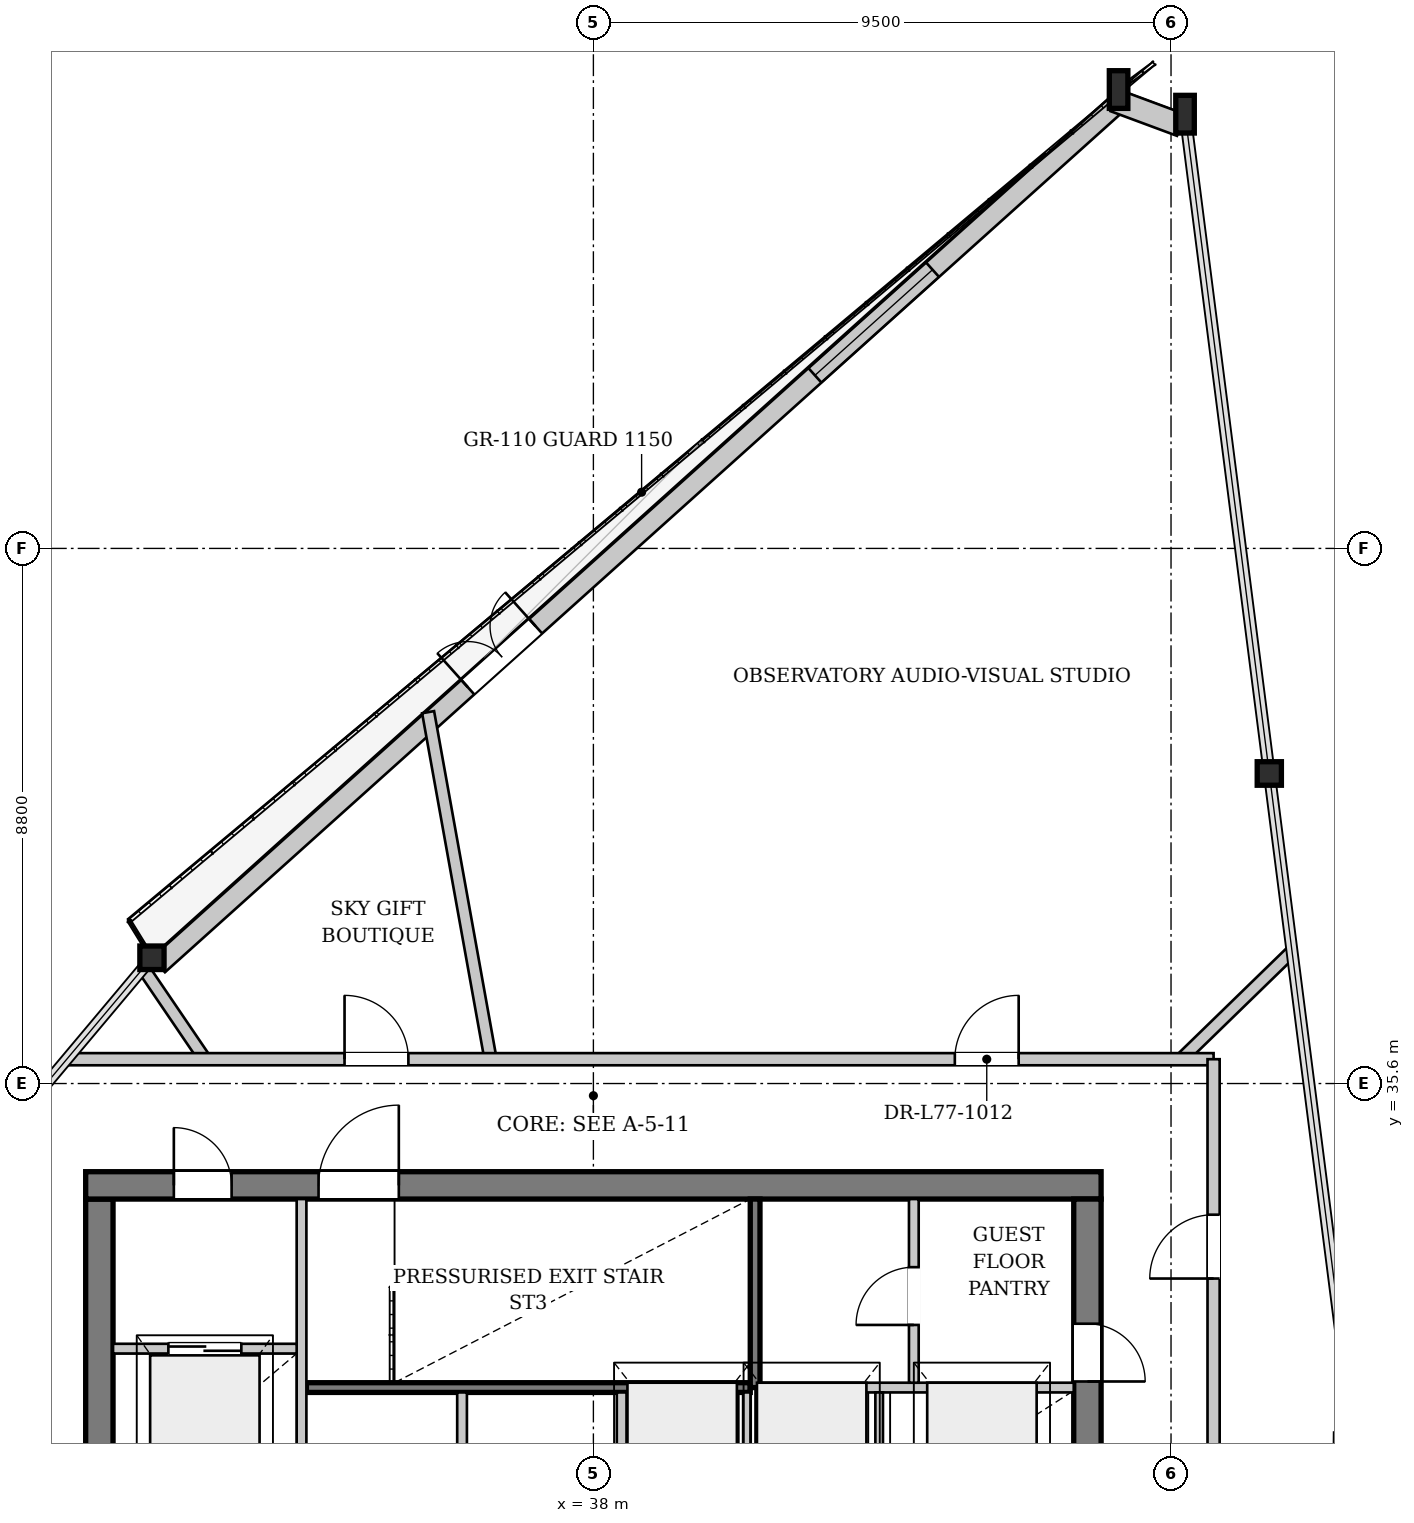
"""IFC4 building model, lengths in metres.
Left out: names, types, materials, properties, quantities, classifications, styles, units other than length and angle.
Written with IfcOpenShell. Run it as: python <this file> out.ifc"""

import sys

from ifc_helpers import new_model, si_unit, direction, frame, frame_2d, origin, origin_2d, place, context, subcontext, project, spatial, rectangle, i_section, extrude, source, transform, mapped, element, fill, save


model = new_model("IFC4")
c1 = context("Model", 3, precision=1e-05, world=origin(), true_north=direction((0.0, 1.0)))
c2 = subcontext(c1, "Body", "Model", "MODEL_VIEW")
j1 = project(units=[si_unit("LENGTHUNIT", "METRE"), si_unit("PLANEANGLEUNIT", "RADIAN")], contexts=[c1])
p1 = place(None, origin())
s1 = spatial("IfcSite", under=j1, at=p1, CompositionType="ELEMENT")
p2 = place(p1, origin())
s2 = spatial("IfcBuilding", under=s1, at=p2, CompositionType="ELEMENT")
p3 = place(p2, frame((0.0, 0.0, 290.5)))
s3 = spatial("IfcBuildingStorey", under=s2, at=p3, CompositionType="ELEMENT", Elevation=290.5)
m1 = source(origin(), c2, "Body", "SweptSolid", [
    extrude(i_section(OverallWidth=0.305, OverallDepth=0.62, WebThickness=0.021, FlangeThickness=0.04, at=origin_2d()), origin(), (0.0, 0.0, 1.0), 4.255),
])
for number, where, z_axis, x_axis in (
    (1, (47.73, 51.541, 0.0), (0.0, 0.0, 1.0), (1.0, 0.0, 0.0)),
    (2, (46.638, 51.946, 0.0), (0.0, 0.0, 1.0), (1.0, 0.0, 0.0)),
):
    element("IfcColumn", number, at=place(p3, frame(where, z_axis=z_axis, x_axis=x_axis)), inside=s3, PredefinedType="COLUMN", context=c2, shape_type="MappedRepresentation", body=[
        mapped(m1, transform((0.0, 0.0, 0.0), x_axis=(1.0, 0.0, 0.0), y_axis=(0.0, 1.0, 0.0), z_axis=(0.0, 0.0, 1.0), scale=1.0)),
    ])
m2 = source(origin(), c2, "Body", "SweptSolid", [
    extrude(i_section(OverallWidth=0.398, OverallDepth=0.387, WebThickness=0.019, FlangeThickness=0.029, at=origin_2d()), origin(), (0.0, 0.0, 1.0), 4.255),
])
for number, where, z_axis, x_axis in (
    (3, (30.74, 37.668, 0.0), (0.0, 0.0, 1.0), (1.0, 0.0, 0.0)),
    (4, (49.116, 40.699, 0.0), (0.0, 0.0, 1.0), (1.0, 0.0, 0.0)),
):
    element("IfcColumn", number, at=place(p3, frame(where, z_axis=z_axis, x_axis=x_axis)), inside=s3, PredefinedType="COLUMN", context=c2, shape_type="MappedRepresentation", body=[
        mapped(m2, transform((0.0, 0.0, 0.0), x_axis=(1.0, 0.0, 0.0), y_axis=(0.0, 1.0, 0.0), z_axis=(0.0, 0.0, 1.0), scale=1.0)),
    ])
p4 = place(p3, frame((50.342, 29.858, 0.0), z_axis=(0.0, 0.0, 1.0), x_axis=(-0.010207538584, -0.999947901721, 0.0)))
e5 = element("IfcWall", 5, at=p4, inside=s3, PredefinedType="SOLIDWALL", context=c2, shape_type="SweptSolid", body=[
    extrude(rectangle(XDim=21.861, YDim=0.32, at=frame_2d((10.93, 0.0))), origin(), (0.0, 0.0, 1.0), 3.782),
])
p5 = place(p4, frame((6.445, 0.0, 0.0)))
e6 = element("IfcOpeningElement", 6, at=p5, cuts=e5, PredefinedType="OPENING", context=c2, shape_type="SweptSolid", body=[
    extrude(rectangle(XDim=1.5, YDim=2.3, at=frame_2d((0.75, 1.15))), frame((0.0, 0.17, 0.0), z_axis=(0.0, -1.0, 0.0), x_axis=(1.0, 0.0, 0.0)), (0.0, 0.0, 1.0), 0.34),
])
p6 = place(p4, frame((14.877, 0.0, 0.65)))
e7 = element("IfcOpeningElement", 7, at=p6, cuts=e5, PredefinedType="OPENING", context=c2, shape_type="SweptSolid", body=[
    extrude(rectangle(XDim=2.6, YDim=2.35, at=frame_2d((1.3, 1.175))), frame((0.0, 0.17, 0.0), z_axis=(0.0, -1.0, 0.0), x_axis=(1.0, 0.0, 0.0)), (0.0, 0.0, 1.0), 0.34),
])
p7 = place(p3, frame((30.847, 37.549, 0.0), z_axis=(0.0, 0.0, 1.0), x_axis=(0.743983447959, 0.668198046363, 0.0)))
e8 = element("IfcWall", 8, at=p7, inside=s3, PredefinedType="SOLIDWALL", context=c2, shape_type="SweptSolid", body=[
    extrude(rectangle(XDim=21.368, YDim=0.32, at=frame_2d((10.684, 0.0))), origin(), (0.0, 0.0, 1.0), 3.782),
])
p8 = place(p7, frame((6.838, 0.0, 0.0)))
e9 = element("IfcOpeningElement", 9, at=p8, cuts=e8, PredefinedType="OPENING", context=c2, shape_type="SweptSolid", body=[
    extrude(rectangle(XDim=1.5, YDim=2.3, at=frame_2d((0.75, 1.15))), frame((0.0, 0.17, 0.0), z_axis=(0.0, -1.0, 0.0), x_axis=(1.0, 0.0, 0.0)), (0.0, 0.0, 1.0), 0.34),
])
p9 = place(p7, frame((14.512, 0.0, 0.65)))
e10 = element("IfcOpeningElement", 10, at=p9, cuts=e8, PredefinedType="OPENING", context=c2, shape_type="SweptSolid", body=[
    extrude(rectangle(XDim=2.6, YDim=2.35, at=frame_2d((1.3, 1.175))), frame((0.0, 0.17, 0.0), z_axis=(0.0, -1.0, 0.0), x_axis=(1.0, 0.0, 0.0)), (0.0, 0.0, 1.0), 0.34),
])
p10 = place(p3, frame((46.572, 51.768, 0.0), z_axis=(0.0, 0.0, 1.0), x_axis=(0.937597063116, -0.347723665052, 0.0)))
e11 = element("IfcWall", 11, at=p10, inside=s3, PredefinedType="SOLIDWALL", context=c2, shape_type="SweptSolid", body=[
    extrude(rectangle(XDim=1.166, YDim=0.38, at=frame_2d((0.583, 0.0))), origin(), (0.0, 0.0, 1.0), 3.782),
])
p11 = place(p3, frame((29.875, 19.5, 0.0), z_axis=(0.0, 0.0, 1.0), x_axis=(0.0, 1.0, 0.0)))
e12 = element("IfcWall", 12, at=p11, inside=s3, PredefinedType="SHEAR", context=c2, shape_type="SweptSolid", body=[
    extrude(rectangle(XDim=14.2, YDim=0.45, at=frame_2d((7.1, 0.0))), origin(), (0.0, 0.0, 1.0), 4.24),
])
p12 = place(p11, frame((7.42, 0.0, 0.0)))
e13 = element("IfcOpeningElement", 13, at=p12, cuts=e12, PredefinedType="OPENING", context=c2, shape_type="SweptSolid", body=[
    extrude(rectangle(XDim=1.6, YDim=2.2, at=frame_2d((0.8, 1.1))), frame((0.0, 0.235, 0.0), z_axis=(0.0, -1.0, 0.0), x_axis=(1.0, 0.0, 0.0)), (0.0, 0.0, 1.0), 0.47),
])
p13 = place(p3, frame((29.65, 33.925, 0.0), z_axis=(0.0, 0.0, 1.0), x_axis=(1.0, 0.0, 0.0)))
e14 = element("IfcWall", 14, at=p13, inside=s3, PredefinedType="SHEAR", context=c2, shape_type="SweptSolid", body=[
    extrude(rectangle(XDim=16.7, YDim=0.45, at=frame_2d((8.35, 0.0))), origin(), (0.0, 0.0, 1.0), 4.24),
])
p14 = place(p13, frame((1.45, 0.0, 0.0)))
e15 = element("IfcOpeningElement", 15, at=p14, cuts=e14, PredefinedType="OPENING", context=c2, shape_type="SweptSolid", body=[
    extrude(rectangle(XDim=0.95, YDim=2.1, at=frame_2d((0.475, 1.05))), frame((0.0, 0.235, 0.0), z_axis=(0.0, -1.0, 0.0), x_axis=(1.0, 0.0, 0.0)), (0.0, 0.0, 1.0), 0.47),
])
p15 = place(p13, frame((3.83, 0.0, 0.0)))
e16 = element("IfcOpeningElement", 16, at=p15, cuts=e14, PredefinedType="OPENING", context=c2, shape_type="SweptSolid", body=[
    extrude(rectangle(XDim=1.32, YDim=2.2, at=frame_2d((0.66, 1.1))), frame((0.0, 0.235, 0.0), z_axis=(0.0, -1.0, 0.0), x_axis=(1.0, 0.0, 0.0)), (0.0, 0.0, 1.0), 0.47),
])
p16 = place(p3, frame((46.125, 33.7, 0.0), z_axis=(0.0, 0.0, 1.0), x_axis=(0.0, -1.0, 0.0)))
e17 = element("IfcWall", 17, at=p16, inside=s3, PredefinedType="SHEAR", context=c2, shape_type="SweptSolid", body=[
    extrude(rectangle(XDim=14.2, YDim=0.45, at=frame_2d((7.1, 0.0))), origin(), (0.0, 0.0, 1.0), 4.24),
])
p17 = place(p16, frame((5.18, 0.0, 0.0)))
e18 = element("IfcOpeningElement", 18, at=p17, cuts=e17, PredefinedType="OPENING", context=c2, shape_type="SweptSolid", body=[
    extrude(rectangle(XDim=1.6, YDim=2.2, at=frame_2d((0.8, 1.1))), frame((0.0, 0.235, 0.0), z_axis=(0.0, -1.0, 0.0), x_axis=(1.0, 0.0, 0.0)), (0.0, 0.0, 1.0), 0.47),
])
p18 = place(p16, frame((2.05, 0.0, 0.0)))
e19 = element("IfcOpeningElement", 19, at=p18, cuts=e17, PredefinedType="OPENING", context=c2, shape_type="SweptSolid", body=[
    extrude(rectangle(XDim=0.95, YDim=2.1, at=frame_2d((0.475, 1.05))), frame((0.0, 0.235, 0.0), z_axis=(0.0, -1.0, 0.0), x_axis=(1.0, 0.0, 0.0)), (0.0, 0.0, 1.0), 0.47),
])
p19 = place(p3, frame((33.28, 30.6, 0.0), z_axis=(0.0, 0.0, 1.0), x_axis=(1.0, 0.0, 0.0)))
e20 = element("IfcWall", 20, at=p19, inside=s3, PredefinedType="PARTITIONING", context=c2, shape_type="SweptSolid", body=[
    extrude(rectangle(XDim=7.3, YDim=0.16, at=frame_2d((3.65, 0.0))), origin(), (0.0, 0.0, 1.0), 4.24),
])
p20 = place(p3, frame((40.66, 30.6, 0.0), z_axis=(0.0, 0.0, 1.0), x_axis=(0.0, 1.0, 0.0)))
e21 = element("IfcWall", 21, at=p20, inside=s3, PredefinedType="PARTITIONING", context=c2, shape_type="SweptSolid", body=[
    extrude(rectangle(XDim=3.1, YDim=0.16, at=frame_2d((1.55, 0.0))), origin(), (0.0, 0.0, 1.0), 4.24),
])
p21 = place(p3, frame((33.2, 28.44, 0.0), z_axis=(0.0, 0.0, 1.0), x_axis=(0.0, 1.0, 0.0)))
e22 = element("IfcWall", 22, at=p21, inside=s3, PredefinedType="PARTITIONING", context=c2, shape_type="SweptSolid", body=[
    extrude(rectangle(XDim=5.26, YDim=0.16, at=frame_2d((2.63, 0.0))), origin(), (0.0, 0.0, 1.0), 4.24),
])
p22 = place(p3, frame((30.1, 31.24, 0.0), z_axis=(0.0, 0.0, 1.0), x_axis=(1.0, 0.0, 0.0)))
e23 = element("IfcWall", 23, at=p22, inside=s3, PredefinedType="PARTITIONING", context=c2, shape_type="SweptSolid", body=[
    extrude(rectangle(XDim=3.02, YDim=0.16, at=frame_2d((1.51, 0.0))), origin(), (0.0, 0.0, 1.0), 4.24),
])
p23 = place(p22, frame((0.91, 0.0, 0.0)))
e24 = element("IfcOpeningElement", 24, at=p23, cuts=e23, PredefinedType="OPENING", context=c2, shape_type="SweptSolid", body=[
    extrude(rectangle(XDim=1.2, YDim=2.2, at=frame_2d((0.6, 1.1))), frame((0.0, 0.09, 0.0), z_axis=(0.0, -1.0, 0.0), x_axis=(1.0, 0.0, 0.0)), (0.0, 0.0, 1.0), 0.18),
])
p24 = place(p3, frame((40.72, 30.6, 0.0), z_axis=(0.0, 0.0, 1.0), x_axis=(1.0, 0.0, 0.0)))
e25 = element("IfcWall", 25, at=p24, inside=s3, PredefinedType="PARTITIONING", context=c2, shape_type="SweptSolid", body=[
    extrude(rectangle(XDim=5.18, YDim=0.16, at=frame_2d((2.59, 0.0))), origin(), (0.0, 0.0, 1.0), 4.24),
])
for number, where, z_axis, x_axis in (
    (26, (35.84, 28.6, 0.0), (0.0, 0.0, 1.0), (0.0, 1.0, 0.0)),
    (27, (38.465, 28.6, 0.0), (0.0, 0.0, 1.0), (0.0, 1.0, 0.0)),
):
    element("IfcWall", number, at=place(p3, frame(where, z_axis=z_axis, x_axis=x_axis)), inside=s3, PredefinedType="PARTITIONING", context=c2, shape_type="SweptSolid", body=[
        extrude(rectangle(XDim=1.92, YDim=0.16, at=frame_2d((0.96, 0.0))), origin(), (0.0, 0.0, 1.0), 4.24),
    ])
for number, where, z_axis, x_axis in (
    (28, (40.525, 28.6, 0.0), (0.0, 0.0, 1.0), (0.0, 1.0, 0.0)),
    (29, (42.7, 28.6, 0.0), (0.0, 0.0, 1.0), (0.0, 1.0, 0.0)),
):
    element("IfcWall", number, at=place(p3, frame(where, z_axis=z_axis, x_axis=x_axis)), inside=s3, PredefinedType="PARTITIONING", context=c2, shape_type="SweptSolid", body=[
        extrude(rectangle(XDim=1.92, YDim=0.125, at=frame_2d((0.96, 0.0))), origin(), (0.0, 0.0, 1.0), 4.24),
    ])
p25 = place(p3, frame((43.27, 30.68, 0.0), z_axis=(0.0, 0.0, 1.0), x_axis=(0.0, 1.0, 0.0)))
e30 = element("IfcWall", 30, at=p25, inside=s3, PredefinedType="PARTITIONING", context=c2, shape_type="SweptSolid", body=[
    extrude(rectangle(XDim=3.02, YDim=0.16, at=frame_2d((1.51, 0.0))), origin(), (0.0, 0.0, 1.0), 4.24),
])
p26 = place(p25, frame((0.95, 0.0, 0.0)))
e31 = element("IfcOpeningElement", 31, at=p26, cuts=e30, PredefinedType="OPENING", context=c2, shape_type="SweptSolid", body=[
    extrude(rectangle(XDim=0.95, YDim=2.1, at=frame_2d((0.475, 1.05))), frame((0.0, 0.09, 0.0), z_axis=(0.0, -1.0, 0.0), x_axis=(1.0, 0.0, 0.0)), (0.0, 0.0, 1.0), 0.18),
])
p27 = place(p3, frame((47.666, 36.0, 0.0), z_axis=(0.0, 0.0, 1.0), x_axis=(0.716875909167, 0.697200782312, 0.0)))
e32 = element("IfcWall", 32, at=p27, inside=s3, PredefinedType="PARTITIONING", context=c2, shape_type="SweptSolid", body=[
    extrude(rectangle(XDim=2.507, YDim=0.2, at=frame_2d((1.253, 0.0))), origin(), (0.0, 0.0, 1.0), 4.24),
])
p28 = place(p3, frame((36.309, 36.0, 0.0), z_axis=(0.0, 0.0, 1.0), x_axis=(-0.177091823181, 0.984194333535, 0.0)))
e33 = element("IfcWall", 33, at=p28, inside=s3, PredefinedType="PARTITIONING", context=c2, shape_type="SweptSolid", body=[
    extrude(rectangle(XDim=5.798, YDim=0.2, at=frame_2d((2.899, 0.0))), origin(), (0.0, 0.0, 1.0), 4.24),
])
p29 = place(p3, frame((31.612, 36.0, 0.0), z_axis=(0.0, 0.0, 1.0), x_axis=(-0.562095840056, 0.827072104833, 0.0)))
e34 = element("IfcWall", 34, at=p29, inside=s3, PredefinedType="PARTITIONING", context=c2, shape_type="SweptSolid", body=[
    extrude(rectangle(XDim=1.777, YDim=0.2, at=frame_2d((0.889, 0.0))), origin(), (0.0, 0.0, 1.0), 3.825),
])
p30 = place(p3, frame((29.378, 36.0, 0.0), z_axis=(0.0, 0.0, 1.0), x_axis=(1.0, 0.0, 0.0)))
e35 = element("IfcWall", 35, at=p30, inside=s3, PredefinedType="PARTITIONING", context=c2, shape_type="SweptSolid", body=[
    extrude(rectangle(XDim=18.822, YDim=0.2, at=frame_2d((9.411, 0.0))), origin(), (0.0, 0.0, 1.0), 4.24),
])
p31 = place(p30, frame((14.566, 0.0, 0.0)))
e36 = element("IfcOpeningElement", 36, at=p31, cuts=e35, PredefinedType="OPENING", context=c2, shape_type="SweptSolid", body=[
    extrude(rectangle(XDim=1.05, YDim=2.2, at=frame_2d((0.525, 1.1))), frame((0.0, 0.11, 0.0), z_axis=(0.0, -1.0, 0.0), x_axis=(1.0, 0.0, 0.0)), (0.0, 0.0, 1.0), 0.22),
])
p32 = place(p30, frame((4.529, 0.0, 0.0)))
e37 = element("IfcOpeningElement", 37, at=p32, cuts=e35, PredefinedType="OPENING", context=c2, shape_type="SweptSolid", body=[
    extrude(rectangle(XDim=1.05, YDim=2.2, at=frame_2d((0.525, 1.1))), frame((0.0, 0.11, 0.0), z_axis=(0.0, -1.0, 0.0), x_axis=(1.0, 0.0, 0.0)), (0.0, 0.0, 1.0), 0.22),
])
p33 = place(p3, frame((48.2, 23.0, 0.0), z_axis=(0.0, 0.0, 1.0), x_axis=(0.0, 1.0, 0.0)))
e38 = element("IfcWall", 38, at=p33, inside=s3, PredefinedType="PARTITIONING", context=c2, shape_type="SweptSolid", body=[
    extrude(rectangle(XDim=13.0, YDim=0.2, at=frame_2d((6.5, 0.0))), origin(), (0.0, 0.0, 1.0), 3.925),
])
p34 = place(p33, frame((9.393, 0.0, 0.0)))
e39 = element("IfcOpeningElement", 39, at=p34, cuts=e38, PredefinedType="OPENING", context=c2, shape_type="SweptSolid", body=[
    extrude(rectangle(XDim=1.05, YDim=2.2, at=frame_2d((0.525, 1.1))), frame((0.0, 0.11, 0.0), z_axis=(0.0, -1.0, 0.0), x_axis=(1.0, 0.0, 0.0)), (0.0, 0.0, 1.0), 0.22),
])
m3 = source(origin(), c2, "Body", "SweptSolid", [
    extrude(rectangle(XDim=1.5, YDim=2.3, at=frame_2d((0.75, 1.15))), frame((0.0, 0.025, 0.0), z_axis=(0.0, -1.0, 0.0), x_axis=(1.0, 0.0, 0.0)), (0.0, 0.0, 1.0), 0.05),
])
p35 = place(p8, origin())
e40 = element("IfcDoor", 40, at=p35, inside=s3, OperationType="DOUBLE_DOOR_SINGLE_SWING", PredefinedType="DOOR", context=c2, shape_type="MappedRepresentation", body=[
    mapped(m3, transform((0.0, 0.0, 0.0), x_axis=(1.0, 0.0, 0.0), y_axis=(0.0, 1.0, 0.0), z_axis=(0.0, 0.0, 1.0), scale=1.0)),
])
fill(e9, e40)
m4 = source(origin(), c2, "Body", "SweptSolid", [
    extrude(rectangle(XDim=2.6, YDim=2.35, at=frame_2d((1.3, 1.175))), frame((0.0, 0.03, 0.0), z_axis=(0.0, -1.0, 0.0), x_axis=(1.0, 0.0, 0.0)), (0.0, 0.0, 1.0), 0.06),
])
p36 = place(p9, origin())
e41 = element("IfcWindow", 41, at=p36, inside=s3, PartitioningType="SINGLE_PANEL", PredefinedType="WINDOW", context=c2, shape_type="MappedRepresentation", body=[
    mapped(m4, transform((0.0, 0.0, 0.0), x_axis=(1.0, 0.0, 0.0), y_axis=(0.0, 1.0, 0.0), z_axis=(0.0, 0.0, 1.0), scale=1.0)),
])
fill(e10, e41)
m5 = source(origin(), c2, "Body", "SweptSolid", [
    extrude(rectangle(XDim=0.95, YDim=2.1, at=frame_2d((0.475, 1.05))), frame((0.0, 0.025, 0.0), z_axis=(0.0, -1.0, 0.0), x_axis=(1.0, 0.0, 0.0)), (0.0, 0.0, 1.0), 0.05),
])
p37 = place(p14, origin())
e42 = element("IfcDoor", 42, at=p37, inside=s3, OperationType="SINGLE_SWING_LEFT", PredefinedType="DOOR", context=c2, shape_type="MappedRepresentation", body=[
    mapped(m5, transform((0.0, 0.0, 0.0), x_axis=(1.0, 0.0, 0.0), y_axis=(0.0, 1.0, 0.0), z_axis=(0.0, 0.0, 1.0), scale=1.0)),
])
fill(e15, e42)
m6 = source(origin(), c2, "Body", "SweptSolid", [
    extrude(rectangle(XDim=1.32, YDim=2.2, at=frame_2d((0.66, 1.1))), frame((0.0, 0.025, 0.0), z_axis=(0.0, -1.0, 0.0), x_axis=(1.0, 0.0, 0.0)), (0.0, 0.0, 1.0), 0.05),
])
p38 = place(p15, origin())
e43 = element("IfcDoor", 43, at=p38, inside=s3, OperationType="SINGLE_SWING_RIGHT", PredefinedType="DOOR", context=c2, shape_type="MappedRepresentation", body=[
    mapped(m6, transform((0.0, 0.0, 0.0), x_axis=(1.0, 0.0, 0.0), y_axis=(0.0, 1.0, 0.0), z_axis=(0.0, 0.0, 1.0), scale=1.0)),
])
fill(e16, e43)
m7 = source(origin(), c2, "Body", "SweptSolid", [
    extrude(rectangle(XDim=1.2, YDim=2.2, at=frame_2d((0.6, 1.1))), frame((0.0, 0.025, 0.0), z_axis=(0.0, -1.0, 0.0), x_axis=(1.0, 0.0, 0.0)), (0.0, 0.0, 1.0), 0.05),
])
p39 = place(p23, origin())
e44 = element("IfcDoor", 44, at=p39, inside=s3, OperationType="DOUBLE_DOOR_SLIDING", PredefinedType="DOOR", context=c2, shape_type="MappedRepresentation", body=[
    mapped(m7, transform((0.0, 0.0, 0.0), x_axis=(1.0, 0.0, 0.0), y_axis=(0.0, 1.0, 0.0), z_axis=(0.0, 0.0, 1.0), scale=1.0)),
])
fill(e24, e44)
p40 = place(p26, origin())
e45 = element("IfcDoor", 45, at=p40, inside=s3, OperationType="SINGLE_SWING_LEFT", PredefinedType="DOOR", context=c2, shape_type="MappedRepresentation", body=[
    mapped(m5, transform((0.0, 0.0, 0.0), x_axis=(1.0, 0.0, 0.0), y_axis=(0.0, 1.0, 0.0), z_axis=(0.0, 0.0, 1.0), scale=1.0)),
])
fill(e31, e45)
p41 = place(p18, origin())
e46 = element("IfcDoor", 46, at=p41, inside=s3, OperationType="SINGLE_SWING_RIGHT", PredefinedType="DOOR", context=c2, shape_type="MappedRepresentation", body=[
    mapped(m5, transform((0.0, 0.0, 0.0), x_axis=(1.0, 0.0, 0.0), y_axis=(0.0, 1.0, 0.0), z_axis=(0.0, 0.0, 1.0), scale=1.0)),
])
fill(e19, e46)
m8 = source(origin(), c2, "Body", "SweptSolid", [
    extrude(rectangle(XDim=1.05, YDim=2.2, at=frame_2d((0.525, 1.1))), frame((0.0, 0.025, 0.0), z_axis=(0.0, -1.0, 0.0), x_axis=(1.0, 0.0, 0.0)), (0.0, 0.0, 1.0), 0.05),
])
p42 = place(p31, origin())
e47 = element("IfcDoor", 47, at=p42, inside=s3, OperationType="SINGLE_SWING_RIGHT", PredefinedType="DOOR", context=c2, shape_type="MappedRepresentation", body=[
    mapped(m8, transform((0.0, 0.0, 0.0), x_axis=(1.0, 0.0, 0.0), y_axis=(0.0, 1.0, 0.0), z_axis=(0.0, 0.0, 1.0), scale=1.0)),
])
fill(e36, e47)
p43 = place(p32, origin())
e48 = element("IfcDoor", 48, at=p43, inside=s3, OperationType="SINGLE_SWING_LEFT", PredefinedType="DOOR", context=c2, shape_type="MappedRepresentation", body=[
    mapped(m8, transform((0.0, 0.0, 0.0), x_axis=(1.0, 0.0, 0.0), y_axis=(0.0, 1.0, 0.0), z_axis=(0.0, 0.0, 1.0), scale=1.0)),
])
fill(e37, e48)
p44 = place(p34, origin())
e49 = element("IfcDoor", 49, at=p44, inside=s3, OperationType="SINGLE_SWING_LEFT", PredefinedType="DOOR", context=c2, shape_type="MappedRepresentation", body=[
    mapped(m8, transform((0.0, 0.0, 0.0), x_axis=(1.0, 0.0, 0.0), y_axis=(0.0, 1.0, 0.0), z_axis=(0.0, 0.0, 1.0), scale=1.0)),
])
fill(e39, e49)
save(model, sys.argv[1])
